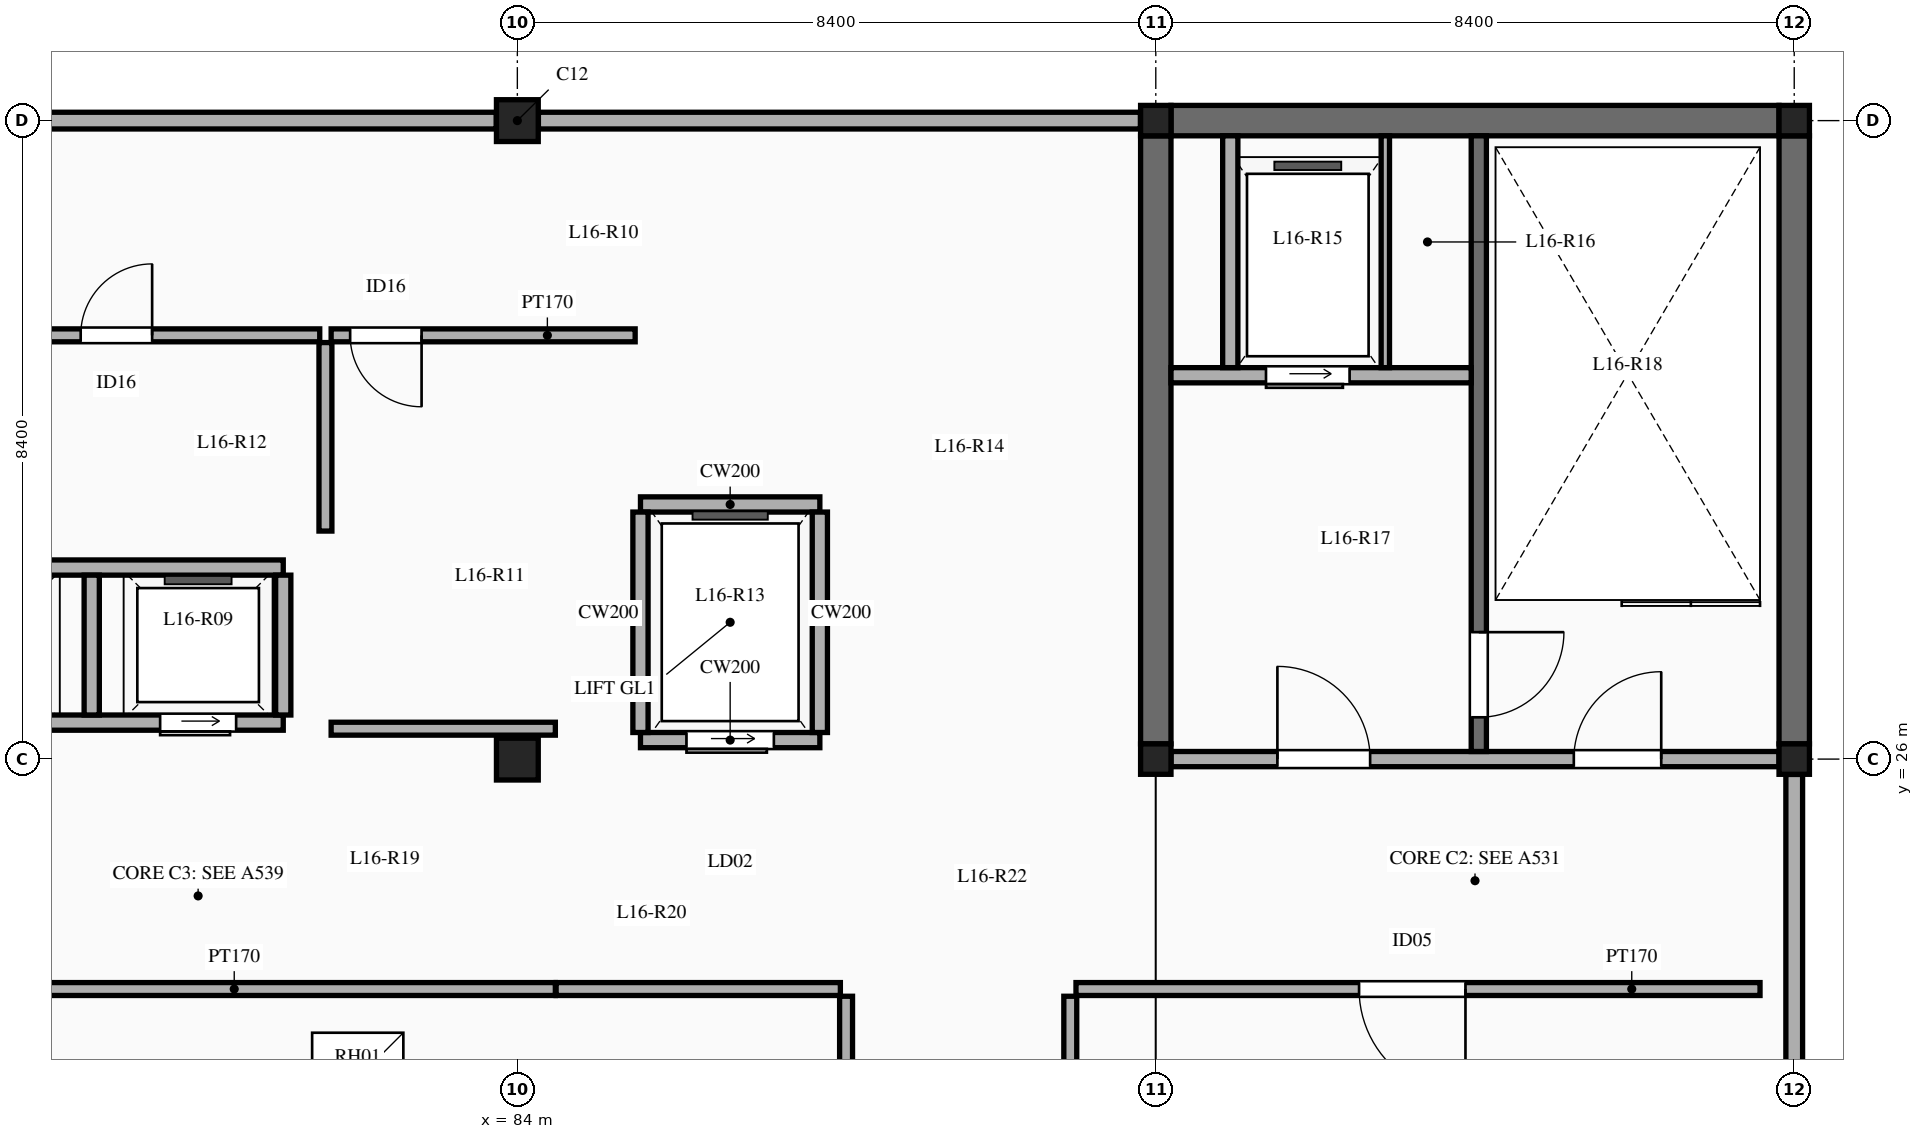
"""IFC4 building model, lengths in metres.
Left out: names, types, materials, properties, quantities, classifications, styles, units other than length and angle.
Written with IfcOpenShell. Run it as: python <this file> out.ifc"""

import sys

from ifc_helpers import new_model, si_unit, direction, frame, frame_2d, origin, origin_2d, place, context, subcontext, project, spatial, rectangle, extrude, element, fill, save


model = new_model("IFC4")
c1 = context("Model", 3, precision=1e-05, world=origin(), true_north=direction((0.0, 1.0)))
c2 = subcontext(c1, "Body", "Model", "MODEL_VIEW")
j1 = project(units=[si_unit("LENGTHUNIT", "METRE"), si_unit("PLANEANGLEUNIT", "RADIAN")], contexts=[c1])
p1 = place(None, origin())
s1 = spatial("IfcSite", under=j1, at=p1, CompositionType="ELEMENT")
p2 = place(p1, origin())
s2 = spatial("IfcBuilding", under=s1, at=p2, CompositionType="ELEMENT")
p3 = place(p2, frame((0.0, 0.0, 73.5)))
s3 = spatial("IfcBuildingStorey", under=s2, at=p3, CompositionType="ELEMENT", Elevation=73.5)
for number, where, z_axis, x_axis in (
    (1, (84.0, 26.0, 0.0), (0.0, 0.0, 1.0), (1.0, 0.0, 0.0)),
    (2, (84.0, 34.4, 0.0), (0.0, 0.0, 1.0), (1.0, 0.0, 0.0)),
):
    element("IfcColumn", number, at=place(p3, frame(where, z_axis=z_axis, x_axis=x_axis)), inside=s3, PredefinedType="COLUMN", context=c2, shape_type="SweptSolid", body=[
        extrude(rectangle(XDim=0.55, YDim=0.55, at=origin_2d()), origin(), (0.0, 0.0, 1.0), 4.5),
    ])
for number, where, z_axis, x_axis in (
    (3, (92.4, 26.0, 0.0), (0.0, 0.0, 1.0), (1.0, 0.0, 0.0)),
    (4, (92.4, 34.4, 0.0), (0.0, 0.0, 1.0), (1.0, 0.0, 0.0)),
    (5, (100.8, 26.0, 0.0), (0.0, 0.0, 1.0), (1.0, 0.0, 0.0)),
    (6, (100.8, 34.4, 0.0), (0.0, 0.0, 1.0), (1.0, 0.0, 0.0)),
):
    element("IfcColumn", number, at=place(p3, frame(where, z_axis=z_axis, x_axis=x_axis)), inside=s3, PredefinedType="COLUMN", context=c2, shape_type="SweptSolid", body=[
        extrude(rectangle(XDim=0.4, YDim=0.4, at=origin_2d()), origin(), (0.0, 0.0, 1.0), 4.5),
    ])
for number, where, z_axis, x_axis in (
    (7, (92.4, 26.2, 0.0), (0.0, 0.0, 1.0), (0.0, 1.0, 0.0)),
    (8, (100.8, 26.2, 0.0), (0.0, 0.0, 1.0), (0.0, 1.0, 0.0)),
    (9, (92.6, 34.4, 0.0), (0.0, 0.0, 1.0), (1.0, 0.0, 0.0)),
):
    element("IfcWall", number, at=place(p3, frame(where, z_axis=z_axis, x_axis=x_axis)), inside=s3, PredefinedType="SHEAR", context=c2, shape_type="SweptSolid", body=[
        extrude(rectangle(XDim=8.0, YDim=0.4, at=frame_2d((4.0, 0.0))), origin(), (0.0, 0.0, 1.0), 4.5),
    ])
p4 = place(p3, frame((75.877, 34.4, 0.0), z_axis=(0.0, 0.0, 1.0), x_axis=(1.0, 0.0, 0.0)))
e10 = element("IfcWall", 10, at=p4, inside=s3, PredefinedType="USERDEFINED", context=c2, shape_type="SweptSolid", body=[
    extrude(rectangle(XDim=7.846, YDim=0.22, at=frame_2d((3.923, 0.0))), origin(), (0.0, 0.0, 1.0), 3.55),
])
p5 = place(p3, frame((84.277, 34.4, 0.0), z_axis=(0.0, 0.0, 1.0), x_axis=(1.0, 0.0, 0.0)))
e11 = element("IfcWall", 11, at=p5, inside=s3, PredefinedType="USERDEFINED", context=c2, shape_type="SweptSolid", body=[
    extrude(rectangle(XDim=7.921, YDim=0.22, at=frame_2d((3.96, 0.0))), origin(), (0.0, 0.0, 1.0), 3.55),
])
p6 = place(p3, frame((100.8, 17.877, 0.0), z_axis=(0.0, 0.0, 1.0), x_axis=(0.0, 1.0, 0.0)))
e12 = element("IfcWall", 12, at=p6, inside=s3, PredefinedType="USERDEFINED", context=c2, shape_type="SweptSolid", body=[
    extrude(rectangle(XDim=7.921, YDim=0.22, at=frame_2d((3.96, 0.0))), origin(), (0.0, 0.0, 1.0), 3.55),
])
p7 = place(p3, frame((92.6, 26.0, 0.0), z_axis=(0.0, 0.0, 1.0), x_axis=(1.0, 0.0, 0.0)))
e13 = element("IfcWall", 13, at=p7, inside=s3, PredefinedType="SOLIDWALL", context=c2, shape_type="SweptSolid", body=[
    extrude(rectangle(XDim=8.0, YDim=0.2, at=frame_2d((4.0, 0.0))), origin(), (0.0, 0.0, 1.0), 3.88),
])
p8 = place(p7, frame((1.4, 0.0, 0.0)))
e14 = element("IfcOpeningElement", 14, at=p8, cuts=e13, PredefinedType="OPENING", context=c2, shape_type="SweptSolid", body=[
    extrude(rectangle(XDim=1.22, YDim=2.15, at=frame_2d((0.61, 1.075))), frame((0.0, 0.11, 0.0), z_axis=(0.0, -1.0, 0.0), x_axis=(1.0, 0.0, 0.0)), (0.0, 0.0, 1.0), 0.22),
])
p9 = place(p7, frame((5.3, 0.0, 0.0)))
e15 = element("IfcOpeningElement", 15, at=p9, cuts=e13, PredefinedType="OPENING", context=c2, shape_type="SweptSolid", body=[
    extrude(rectangle(XDim=1.15, YDim=2.15, at=frame_2d((0.575, 1.075))), frame((0.0, 0.11, 0.0), z_axis=(0.0, -1.0, 0.0), x_axis=(1.0, 0.0, 0.0)), (0.0, 0.0, 1.0), 0.22),
])
p10 = place(p3, frame((96.65, 26.1, 0.0), z_axis=(0.0, 0.0, 1.0), x_axis=(0.0, 1.0, 0.0)))
e16 = element("IfcWall", 16, at=p10, inside=s3, PredefinedType="SOLIDWALL", context=c2, shape_type="SweptSolid", body=[
    extrude(rectangle(XDim=8.1, YDim=0.2, at=frame_2d((4.05, 0.0))), origin(), (0.0, 0.0, 1.0), 4.3),
])
p11 = place(p10, frame((0.45, 0.0, 0.0)))
e17 = element("IfcOpeningElement", 17, at=p11, cuts=e16, PredefinedType="OPENING", context=c2, shape_type="SweptSolid", body=[
    extrude(rectangle(XDim=1.12, YDim=2.15, at=frame_2d((0.56, 1.075))), frame((0.0, 0.11, 0.0), z_axis=(0.0, -1.0, 0.0), x_axis=(1.0, 0.0, 0.0)), (0.0, 0.0, 1.0), 0.22),
])
p12 = place(p3, frame((92.6, 31.05, 0.0), z_axis=(0.0, 0.0, 1.0), x_axis=(1.0, 0.0, 0.0)))
e18 = element("IfcWall", 18, at=p12, inside=s3, PredefinedType="SOLIDWALL", context=c2, shape_type="SweptSolid", body=[
    extrude(rectangle(XDim=3.95, YDim=0.2, at=frame_2d((1.975, 0.0))), origin(), (0.0, 0.0, 1.0), 4.3),
])
p13 = place(p12, frame((1.25, 0.0, 0.0)))
e19 = element("IfcOpeningElement", 19, at=p13, cuts=e18, PredefinedType="OPENING", context=c2, shape_type="SweptSolid", body=[
    extrude(rectangle(XDim=1.1, YDim=2.15, at=frame_2d((0.55, 1.075))), frame((0.0, 0.11, 0.0), z_axis=(0.0, -1.0, 0.0), x_axis=(1.0, 0.0, 0.0)), (0.0, 0.0, 1.0), 0.22),
])
p14 = place(p3, frame((95.42, 31.15, 0.0), z_axis=(0.0, 0.0, 1.0), x_axis=(0.0, 1.0, 0.0)))
e20 = element("IfcWall", 20, at=p14, inside=s3, PredefinedType="PARTITIONING", context=c2, shape_type="SweptSolid", body=[
    extrude(rectangle(XDim=3.05, YDim=0.11, at=frame_2d((1.525, 0.0))), origin(), (0.0, 0.0, 1.0), 4.3),
])
p15 = place(p3, frame((93.38, 31.15, 0.0), z_axis=(0.0, 0.0, 1.0), x_axis=(0.0, 1.0, 0.0)))
e21 = element("IfcWall", 21, at=p15, inside=s3, PredefinedType="SOLIDWALL", context=c2, shape_type="SweptSolid", body=[
    extrude(rectangle(XDim=3.05, YDim=0.2, at=frame_2d((1.525, 0.0))), origin(), (0.0, 0.0, 1.0), 4.3),
])
p16 = place(p3, frame((75.95, 26.48, 0.0), z_axis=(0.0, 0.0, 1.0), x_axis=(1.0, 0.0, 0.0)))
e22 = element("IfcWall", 22, at=p16, inside=s3, PredefinedType="SOLIDWALL", context=c2, shape_type="SweptSolid", body=[
    extrude(rectangle(XDim=4.97, YDim=0.2, at=frame_2d((2.485, 0.0))), origin(), (0.0, 0.0, 1.0), 4.3),
])
p17 = place(p16, frame((0.55, 0.0, 0.0)))
e23 = element("IfcOpeningElement", 23, at=p17, cuts=e22, PredefinedType="OPENING", context=c2, shape_type="SweptSolid", body=[
    extrude(rectangle(XDim=1.0, YDim=2.15, at=frame_2d((0.5, 1.075))), frame((0.0, 0.11, 0.0), z_axis=(0.0, -1.0, 0.0), x_axis=(1.0, 0.0, 0.0)), (0.0, 0.0, 1.0), 0.22),
])
p18 = place(p16, frame((3.35, 0.0, 0.0)))
e24 = element("IfcOpeningElement", 24, at=p18, cuts=e22, PredefinedType="OPENING", context=c2, shape_type="SweptSolid", body=[
    extrude(rectangle(XDim=1.0, YDim=2.15, at=frame_2d((0.5, 1.075))), frame((0.0, 0.11, 0.0), z_axis=(0.0, -1.0, 0.0), x_axis=(1.0, 0.0, 0.0)), (0.0, 0.0, 1.0), 0.22),
])
p19 = place(p3, frame((75.95, 28.52, 0.0), z_axis=(0.0, 0.0, 1.0), x_axis=(1.0, 0.0, 0.0)))
e25 = element("IfcWall", 25, at=p19, inside=s3, PredefinedType="SOLIDWALL", context=c2, shape_type="SweptSolid", body=[
    extrude(rectangle(XDim=4.97, YDim=0.2, at=frame_2d((2.485, 0.0))), origin(), (0.0, 0.0, 1.0), 4.3),
])
for number, where, z_axis, x_axis in (
    (26, (78.4, 26.58, 0.0), (0.0, 0.0, 1.0), (0.0, 1.0, 0.0)),
    (27, (80.92, 26.58, 0.0), (0.0, 0.0, 1.0), (0.0, 1.0, 0.0)),
):
    element("IfcWall", number, at=place(p3, frame(where, z_axis=z_axis, x_axis=x_axis)), inside=s3, PredefinedType="SOLIDWALL", context=c2, shape_type="SweptSolid", body=[
        extrude(rectangle(XDim=1.84, YDim=0.2, at=frame_2d((0.92, 0.0))), origin(), (0.0, 0.0, 1.0), 4.3),
    ])
p20 = place(p3, frame((85.62, 26.25, 0.0), z_axis=(0.0, 0.0, 1.0), x_axis=(1.0, 0.0, 0.0)))
e28 = element("IfcWall", 28, at=p20, inside=s3, PredefinedType="SOLIDWALL", context=c2, shape_type="SweptSolid", body=[
    extrude(rectangle(XDim=2.36, YDim=0.2, at=frame_2d((1.18, 0.0))), origin(), (0.0, 0.0, 1.0), 3.88),
])
p21 = place(p20, frame((0.605, 0.0, 0.0)))
e29 = element("IfcOpeningElement", 29, at=p21, cuts=e28, PredefinedType="OPENING", context=c2, shape_type="SweptSolid", body=[
    extrude(rectangle(XDim=1.15, YDim=2.2, at=frame_2d((0.575, 1.1))), frame((0.0, 0.11, 0.0), z_axis=(0.0, -1.0, 0.0), x_axis=(1.0, 0.0, 0.0)), (0.0, 0.0, 1.0), 0.22),
])
p22 = place(p3, frame((85.62, 29.35, 0.0), z_axis=(0.0, 0.0, 1.0), x_axis=(1.0, 0.0, 0.0)))
e30 = element("IfcWall", 30, at=p22, inside=s3, PredefinedType="SOLIDWALL", context=c2, shape_type="SweptSolid", body=[
    extrude(rectangle(XDim=2.36, YDim=0.2, at=frame_2d((1.18, 0.0))), origin(), (0.0, 0.0, 1.0), 4.3),
])
p23 = place(p3, frame((85.62, 26.35, 0.0), z_axis=(0.0, 0.0, 1.0), x_axis=(0.0, 1.0, 0.0)))
e31 = element("IfcWall", 31, at=p23, inside=s3, PredefinedType="SOLIDWALL", context=c2, shape_type="SweptSolid", body=[
    extrude(rectangle(XDim=2.9, YDim=0.2, at=frame_2d((1.45, 0.0))), origin(), (0.0, 0.0, 1.0), 4.3),
])
p24 = place(p3, frame((87.98, 26.35, 0.0), z_axis=(0.0, 0.0, 1.0), x_axis=(0.0, 1.0, 0.0)))
e32 = element("IfcWall", 32, at=p24, inside=s3, PredefinedType="SOLIDWALL", context=c2, shape_type="SweptSolid", body=[
    extrude(rectangle(XDim=2.9, YDim=0.2, at=frame_2d((1.45, 0.0))), origin(), (0.0, 0.0, 1.0), 4.03),
])
p25 = place(p3, frame((81.55, 31.575, 0.0), z_axis=(0.0, 0.0, 1.0), x_axis=(1.0, 0.0, 0.0)))
e33 = element("IfcWall", 33, at=p25, inside=s3, PredefinedType="PARTITIONING", context=c2, shape_type="SweptSolid", body=[
    extrude(rectangle(XDim=4.0, YDim=0.17, at=frame_2d((2.0, 0.0))), origin(), (0.0, 0.0, 1.0), 3.45),
])
p26 = place(p25, frame((0.25, 0.0, 0.0)))
e34 = element("IfcOpeningElement", 34, at=p26, cuts=e33, PredefinedType="OPENING", context=c2, shape_type="SweptSolid", body=[
    extrude(rectangle(XDim=0.94, YDim=2.1, at=frame_2d((0.47, 1.05))), frame((0.0, 0.095, 0.0), z_axis=(0.0, -1.0, 0.0), x_axis=(1.0, 0.0, 0.0)), (0.0, 0.0, 1.0), 0.19),
])
p27 = place(p3, frame((76.2, 31.575, 0.0), z_axis=(0.0, 0.0, 1.0), x_axis=(1.0, 0.0, 0.0)))
e35 = element("IfcWall", 35, at=p27, inside=s3, PredefinedType="PARTITIONING", context=c2, shape_type="SweptSolid", body=[
    extrude(rectangle(XDim=5.2, YDim=0.17, at=frame_2d((2.6, 0.0))), origin(), (0.0, 0.0, 1.0), 3.45),
])
p28 = place(p27, frame((2.055, 0.0, 0.0)))
e36 = element("IfcOpeningElement", 36, at=p28, cuts=e35, PredefinedType="OPENING", context=c2, shape_type="SweptSolid", body=[
    extrude(rectangle(XDim=0.94, YDim=2.1, at=frame_2d((0.47, 1.05))), frame((0.0, 0.095, 0.0), z_axis=(0.0, -1.0, 0.0), x_axis=(1.0, 0.0, 0.0)), (0.0, 0.0, 1.0), 0.19),
])
p29 = place(p3, frame((81.475, 29.0, 0.0), z_axis=(0.0, 0.0, 1.0), x_axis=(0.0, 1.0, 0.0)))
e37 = element("IfcWall", 37, at=p29, inside=s3, PredefinedType="PARTITIONING", context=c2, shape_type="SweptSolid", body=[
    extrude(rectangle(XDim=2.48, YDim=0.17, at=frame_2d((1.24, 0.0))), origin(), (0.0, 0.0, 1.0), 3.45),
])
p30 = place(p3, frame((81.55, 26.4, 0.0), z_axis=(0.0, 0.0, 1.0), x_axis=(1.0, 0.0, 0.0)))
e38 = element("IfcWall", 38, at=p30, inside=s3, PredefinedType="PARTITIONING", context=c2, shape_type="SweptSolid", body=[
    extrude(rectangle(XDim=2.95, YDim=0.17, at=frame_2d((1.475, 0.0))), origin(), (0.0, 0.0, 1.0), 3.45),
])
p31 = place(p3, frame((76.05, 22.975, 0.0), z_axis=(0.0, 0.0, 1.0), x_axis=(1.0, 0.0, 0.0)))
e39 = element("IfcWall", 39, at=p31, inside=s3, PredefinedType="PARTITIONING", context=c2, shape_type="SweptSolid", body=[
    extrude(rectangle(XDim=8.45, YDim=0.17, at=frame_2d((4.225, 0.0))), origin(), (0.0, 0.0, 1.0), 3.45),
])
p32 = place(p3, frame((84.51, 22.975, 0.0), z_axis=(0.0, 0.0, 1.0), x_axis=(1.0, 0.0, 0.0)))
e40 = element("IfcWall", 40, at=p32, inside=s3, PredefinedType="PARTITIONING", context=c2, shape_type="SweptSolid", body=[
    extrude(rectangle(XDim=3.74, YDim=0.17, at=frame_2d((1.87, 0.0))), origin(), (0.0, 0.0, 1.0), 3.45),
])
p33 = place(p3, frame((91.35, 22.975, 0.0), z_axis=(0.0, 0.0, 1.0), x_axis=(1.0, 0.0, 0.0)))
e41 = element("IfcWall", 41, at=p33, inside=s3, PredefinedType="PARTITIONING", context=c2, shape_type="SweptSolid", body=[
    extrude(rectangle(XDim=9.0, YDim=0.17, at=frame_2d((4.5, 0.0))), origin(), (0.0, 0.0, 1.0), 3.45),
])
p34 = place(p33, frame((3.725, 0.0, 0.0)))
e42 = element("IfcOpeningElement", 42, at=p34, cuts=e41, PredefinedType="OPENING", context=c2, shape_type="SweptSolid", body=[
    extrude(rectangle(XDim=1.4, YDim=2.25, at=frame_2d((0.7, 1.125))), frame((0.0, 0.095, 0.0), z_axis=(0.0, -1.0, 0.0), x_axis=(1.0, 0.0, 0.0)), (0.0, 0.0, 1.0), 0.19),
])
p35 = place(p3, frame((88.325, 13.0, 0.0), z_axis=(0.0, 0.0, 1.0), x_axis=(0.0, 1.0, 0.0)))
e43 = element("IfcWall", 43, at=p35, inside=s3, PredefinedType="PARTITIONING", context=c2, shape_type="SweptSolid", body=[
    extrude(rectangle(XDim=9.88, YDim=0.17, at=frame_2d((4.94, 0.0))), origin(), (0.0, 0.0, 1.0), 3.45),
])
p36 = place(p35, frame((4.165, 0.0, 0.0)))
e44 = element("IfcOpeningElement", 44, at=p36, cuts=e43, PredefinedType="OPENING", context=c2, shape_type="SweptSolid", body=[
    extrude(rectangle(XDim=1.4, YDim=2.25, at=frame_2d((0.7, 1.125))), frame((0.0, 0.095, 0.0), z_axis=(0.0, -1.0, 0.0), x_axis=(1.0, 0.0, 0.0)), (0.0, 0.0, 1.0), 0.19),
])
p37 = place(p3, frame((91.275, 15.2, 0.0), z_axis=(0.0, 0.0, 1.0), x_axis=(0.0, 1.0, 0.0)))
e45 = element("IfcWall", 45, at=p37, inside=s3, PredefinedType="PARTITIONING", context=c2, shape_type="SweptSolid", body=[
    extrude(rectangle(XDim=7.68, YDim=0.17, at=frame_2d((3.84, 0.0))), origin(), (0.0, 0.0, 1.0), 3.45),
])
p38 = place(p2, frame((0.0, 0.0, 78.0)))
p39 = place(p38, frame((0.0, 0.0, -0.23)))
p40 = place(p39, frame((81.9, 21.8, 0.0)))
p41 = place(p40, frame((0.0, 0.0, 0.18)))
e46 = element("IfcWindow", 46, at=p41, inside=s3, PartitioningType="SINGLE_PANEL", PredefinedType="SKYLIGHT", context=c2, shape_type="SweptSolid", body=[
    extrude(rectangle(XDim=1.2, YDim=1.2, at=origin_2d()), origin(), (0.0, 0.0, 1.0), 0.05),
])
p42 = place(p8, origin())
e47 = element("IfcDoor", 47, at=p42, inside=s3, OperationType="SINGLE_SWING_LEFT", PredefinedType="DOOR", context=c2, shape_type="SweptSolid", body=[
    extrude(rectangle(XDim=1.22, YDim=2.15, at=frame_2d((0.61, 1.075))), frame((0.0, 0.025, 0.0), z_axis=(0.0, -1.0, 0.0), x_axis=(1.0, 0.0, 0.0)), (0.0, 0.0, 1.0), 0.05),
])
fill(e14, e47)
p43 = place(p9, origin())
e48 = element("IfcDoor", 48, at=p43, inside=s3, OperationType="SINGLE_SWING_RIGHT", PredefinedType="DOOR", context=c2, shape_type="SweptSolid", body=[
    extrude(rectangle(XDim=1.15, YDim=2.15, at=frame_2d((0.575, 1.075))), frame((0.0, 0.025, 0.0), z_axis=(0.0, -1.0, 0.0), x_axis=(1.0, 0.0, 0.0)), (0.0, 0.0, 1.0), 0.05),
])
fill(e15, e48)
p44 = place(p11, frame((1.12, 0.0, 0.0), z_axis=(0.0, 0.0, 1.0), x_axis=(-1.0, 0.0, 0.0)))
e49 = element("IfcDoor", 49, at=p44, inside=s3, OperationType="SINGLE_SWING_LEFT", PredefinedType="DOOR", context=c2, shape_type="SweptSolid", body=[
    extrude(rectangle(XDim=1.12, YDim=2.15, at=frame_2d((0.56, 1.075))), frame((0.0, 0.025, 0.0), z_axis=(0.0, -1.0, 0.0), x_axis=(1.0, 0.0, 0.0)), (0.0, 0.0, 1.0), 0.05),
])
fill(e17, e49)
p45 = place(p13, frame((1.1, 0.0, 0.0), z_axis=(0.0, 0.0, 1.0), x_axis=(-1.0, 0.0, 0.0)))
e50 = element("IfcDoor", 50, at=p45, inside=s3, OperationType="SLIDING_TO_LEFT", PredefinedType="DOOR", context=c2, shape_type="SweptSolid", body=[
    extrude(rectangle(XDim=1.1, YDim=2.15, at=frame_2d((0.55, 1.075))), frame((0.0, 0.025, 0.0), z_axis=(0.0, -1.0, 0.0), x_axis=(1.0, 0.0, 0.0)), (0.0, 0.0, 1.0), 0.05),
])
fill(e19, e50)
p46 = place(p18, frame((1.0, 0.0, 0.0), z_axis=(0.0, 0.0, 1.0), x_axis=(-1.0, 0.0, 0.0)))
e51 = element("IfcDoor", 51, at=p46, inside=s3, OperationType="SLIDING_TO_LEFT", PredefinedType="DOOR", context=c2, shape_type="SweptSolid", body=[
    extrude(rectangle(XDim=1.0, YDim=2.15, at=frame_2d((0.5, 1.075))), frame((0.0, 0.025, 0.0), z_axis=(0.0, -1.0, 0.0), x_axis=(1.0, 0.0, 0.0)), (0.0, 0.0, 1.0), 0.05),
])
fill(e24, e51)
p47 = place(p21, frame((1.15, 0.0, 0.0), z_axis=(0.0, 0.0, 1.0), x_axis=(-1.0, 0.0, 0.0)))
e52 = element("IfcDoor", 52, at=p47, inside=s3, OperationType="SLIDING_TO_LEFT", PredefinedType="DOOR", context=c2, shape_type="SweptSolid", body=[
    extrude(rectangle(XDim=1.15, YDim=2.2, at=frame_2d((0.575, 1.1))), frame((0.0, 0.025, 0.0), z_axis=(0.0, -1.0, 0.0), x_axis=(1.0, 0.0, 0.0)), (0.0, 0.0, 1.0), 0.05),
])
fill(e29, e52)
p48 = place(p26, frame((0.94, 0.0, 0.0), z_axis=(0.0, 0.0, 1.0), x_axis=(-1.0, 0.0, 0.0)))
e53 = element("IfcDoor", 53, at=p48, inside=s3, OperationType="SINGLE_SWING_LEFT", PredefinedType="DOOR", context=c2, shape_type="SweptSolid", body=[
    extrude(rectangle(XDim=0.94, YDim=2.1, at=frame_2d((0.47, 1.05))), frame((0.0, 0.025, 0.0), z_axis=(0.0, -1.0, 0.0), x_axis=(1.0, 0.0, 0.0)), (0.0, 0.0, 1.0), 0.05),
])
fill(e34, e53)
p49 = place(p28, origin())
e54 = element("IfcDoor", 54, at=p49, inside=s3, OperationType="SINGLE_SWING_RIGHT", PredefinedType="DOOR", context=c2, shape_type="SweptSolid", body=[
    extrude(rectangle(XDim=0.94, YDim=2.1, at=frame_2d((0.47, 1.05))), frame((0.0, 0.025, 0.0), z_axis=(0.0, -1.0, 0.0), x_axis=(1.0, 0.0, 0.0)), (0.0, 0.0, 1.0), 0.05),
])
fill(e36, e54)
p50 = place(p34, frame((1.4, 0.0, 0.0), z_axis=(0.0, 0.0, 1.0), x_axis=(-1.0, 0.0, 0.0)))
e55 = element("IfcDoor", 55, at=p50, inside=s3, OperationType="SINGLE_SWING_LEFT", PredefinedType="DOOR", context=c2, shape_type="SweptSolid", body=[
    extrude(rectangle(XDim=1.4, YDim=2.25, at=frame_2d((0.7, 1.125))), frame((0.0, 0.025, 0.0), z_axis=(0.0, -1.0, 0.0), x_axis=(1.0, 0.0, 0.0)), (0.0, 0.0, 1.0), 0.05),
])
fill(e42, e55)
save(model, sys.argv[1])
